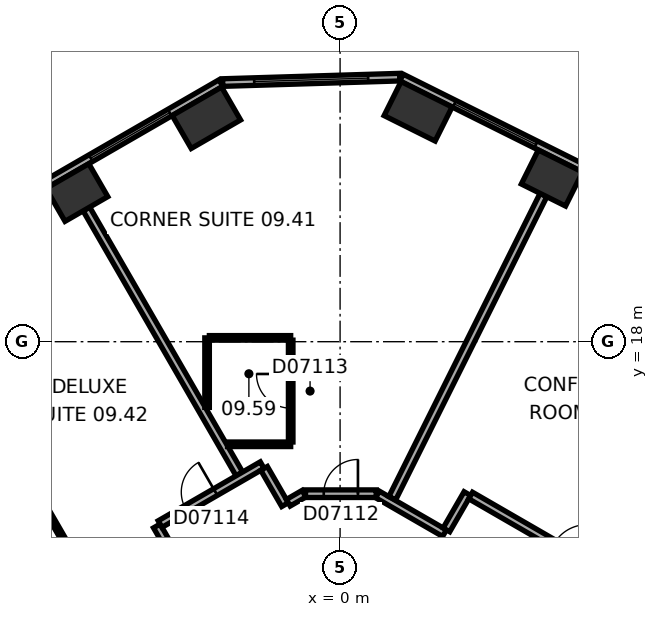
"""IFC4 building model, lengths in metres.
Left out: names, types, materials, properties, quantities, classifications, styles, units other than length and angle.
Written with IfcOpenShell. Run it as: python <this file> out.ifc"""

import sys

from ifc_helpers import new_model, si_unit, direction, frame, frame_2d, origin, origin_2d, place, context, subcontext, project, spatial, rectangle, extrude, element, fill, save


model = new_model("IFC4")
c1 = context("Model", 3, precision=1e-05, world=origin(), true_north=direction((0.0, 1.0)))
c2 = subcontext(c1, "Body", "Model", "MODEL_VIEW")
j1 = project(units=[si_unit("LENGTHUNIT", "METRE"), si_unit("PLANEANGLEUNIT", "RADIAN")], contexts=[c1])
p1 = place(None, origin())
s1 = spatial("IfcSite", under=j1, at=p1, CompositionType="ELEMENT")
p2 = place(p1, origin())
s2 = spatial("IfcBuilding", under=s1, at=p2, CompositionType="ELEMENT")
p3 = place(p2, frame((0.0, 0.0, 50.6)))
s3 = spatial("IfcBuildingStorey", under=s2, at=p3, CompositionType="ELEMENT", Elevation=50.6)
p4 = place(p3, frame((5.574, 22.306, 0.0), z_axis=(0.0, 0.0, 1.0), x_axis=(-0.894934361602, 0.44619781311, 0.0)))
e1 = element("IfcColumn", 1, at=p4, inside=s3, PredefinedType="COLUMN", context=c2, shape_type="SweptSolid", body=[
    extrude(rectangle(XDim=1.3, YDim=1.0, at=origin_2d()), origin(), (0.0, 0.0, 1.0), 3.3),
])
for number, where, z_axis, x_axis in (
    (2, (2.053, 24.062, 0.0), (0.0, 0.0, 1.0), (-0.895, 0.446, 0.0)),
    (3, (-3.518, 23.892, 0.0), (0.0, 0.0, 1.0), (-0.866, -0.5, 0.0)),
):
    element("IfcColumn", number, at=place(p3, frame(where, z_axis=z_axis, x_axis=x_axis)), inside=s3, PredefinedType="COLUMN", context=c2, shape_type="SweptSolid", body=[
        extrude(rectangle(XDim=1.5, YDim=1.0, at=origin_2d()), origin(), (0.0, 0.0, 1.0), 3.3),
    ])
p5 = place(p3, frame((-6.926, 21.925, 0.0), z_axis=(0.0, 0.0, 1.0), x_axis=(-0.866025403784, -0.5, 0.0)))
e4 = element("IfcColumn", 4, at=p5, inside=s3, PredefinedType="COLUMN", context=c2, shape_type="SweptSolid", body=[
    extrude(rectangle(XDim=1.3, YDim=1.0, at=origin_2d()), origin(), (0.0, 0.0, 1.0), 3.3),
])
p6 = place(p3, frame((20.63, 15.47, 0.0), z_axis=(0.0, 0.0, 1.0), x_axis=(-0.894934518609, 0.446197498203, 0.0)))
e5 = element("IfcWall", 5, at=p6, inside=s3, PredefinedType="STANDARD", context=c2, shape_type="SweptSolid", body=[
    extrude(rectangle(XDim=21.246, YDim=0.2, at=frame_2d((10.623, 0.0))), origin(), (0.0, 0.0, 1.0), 3.3),
])
p7 = place(p6, frame((1.553, 0.0, 0.8)))
e6 = element("IfcOpeningElement", 6, at=p7, cuts=e5, PredefinedType="OPENING", context=c2, shape_type="SweptSolid", body=[
    extrude(rectangle(XDim=2.4, YDim=1.7, at=frame_2d((1.2, 0.85))), frame((0.0, 0.11, 0.0), z_axis=(0.0, -1.0, 0.0), x_axis=(1.0, 0.0, 0.0)), (0.0, 0.0, 1.0), 0.22),
])
p8 = place(p6, frame((5.488, 0.0, 0.8)))
e7 = element("IfcOpeningElement", 7, at=p8, cuts=e5, PredefinedType="OPENING", context=c2, shape_type="SweptSolid", body=[
    extrude(rectangle(XDim=2.4, YDim=1.7, at=frame_2d((1.2, 0.85))), frame((0.0, 0.11, 0.0), z_axis=(0.0, -1.0, 0.0), x_axis=(1.0, 0.0, 0.0)), (0.0, 0.0, 1.0), 0.22),
])
p9 = place(p6, frame((9.422, 0.0, 0.8)))
e8 = element("IfcOpeningElement", 8, at=p9, cuts=e5, PredefinedType="OPENING", context=c2, shape_type="SweptSolid", body=[
    extrude(rectangle(XDim=2.4, YDim=1.7, at=frame_2d((1.2, 0.85))), frame((0.0, 0.11, 0.0), z_axis=(0.0, -1.0, 0.0), x_axis=(1.0, 0.0, 0.0)), (0.0, 0.0, 1.0), 0.22),
])
p10 = place(p6, frame((13.357, 0.0, 0.8)))
e9 = element("IfcOpeningElement", 9, at=p10, cuts=e5, PredefinedType="OPENING", context=c2, shape_type="SweptSolid", body=[
    extrude(rectangle(XDim=2.4, YDim=1.7, at=frame_2d((1.2, 0.85))), frame((0.0, 0.11, 0.0), z_axis=(0.0, -1.0, 0.0), x_axis=(1.0, 0.0, 0.0)), (0.0, 0.0, 1.0), 0.22),
])
p11 = place(p6, frame((17.292, 0.0, 0.8)))
e10 = element("IfcOpeningElement", 10, at=p11, cuts=e5, PredefinedType="OPENING", context=c2, shape_type="SweptSolid", body=[
    extrude(rectangle(XDim=2.4, YDim=1.7, at=frame_2d((1.2, 0.85))), frame((0.0, 0.11, 0.0), z_axis=(0.0, -1.0, 0.0), x_axis=(1.0, 0.0, 0.0)), (0.0, 0.0, 1.0), 0.22),
])
p12 = place(p3, frame((1.568, 24.961, 0.0), z_axis=(0.0, 0.0, 1.0), x_axis=(-0.999533359013, -0.030546099927, 0.0)))
e11 = element("IfcWall", 11, at=p12, inside=s3, PredefinedType="STANDARD", context=c2, shape_type="SweptSolid", body=[
    extrude(rectangle(XDim=4.66, YDim=0.2, at=frame_2d((2.33, 0.0))), origin(), (0.0, 0.0, 1.0), 3.3),
])
p13 = place(p12, frame((0.83, 0.0, 0.8)))
e12 = element("IfcOpeningElement", 12, at=p13, cuts=e11, PredefinedType="OPENING", context=c2, shape_type="SweptSolid", body=[
    extrude(rectangle(XDim=3.0, YDim=1.7, at=frame_2d((1.5, 0.85))), frame((0.0, 0.11, 0.0), z_axis=(0.0, -1.0, 0.0), x_axis=(1.0, 0.0, 0.0)), (0.0, 0.0, 1.0), 0.22),
])
p14 = place(p3, frame((-3.136, 24.805, 0.0), z_axis=(0.0, 0.0, 1.0), x_axis=(-0.866028291626, -0.499994998079, 0.0)))
e13 = element("IfcWall", 13, at=p14, inside=s3, PredefinedType="STANDARD", context=c2, shape_type="SweptSolid", body=[
    extrude(rectangle(XDim=21.246, YDim=0.2, at=frame_2d((10.623, 0.0))), origin(), (0.0, 0.0, 1.0), 3.3),
])
p15 = place(p14, frame((1.555, 0.0, 0.8)))
e14 = element("IfcOpeningElement", 14, at=p15, cuts=e13, PredefinedType="OPENING", context=c2, shape_type="SweptSolid", body=[
    extrude(rectangle(XDim=2.4, YDim=1.7, at=frame_2d((1.2, 0.85))), frame((0.0, 0.11, 0.0), z_axis=(0.0, -1.0, 0.0), x_axis=(1.0, 0.0, 0.0)), (0.0, 0.0, 1.0), 0.22),
])
p16 = place(p14, frame((5.489, 0.0, 0.8)))
e15 = element("IfcOpeningElement", 15, at=p16, cuts=e13, PredefinedType="OPENING", context=c2, shape_type="SweptSolid", body=[
    extrude(rectangle(XDim=2.4, YDim=1.7, at=frame_2d((1.2, 0.85))), frame((0.0, 0.11, 0.0), z_axis=(0.0, -1.0, 0.0), x_axis=(1.0, 0.0, 0.0)), (0.0, 0.0, 1.0), 0.22),
])
p17 = place(p14, frame((9.424, 0.0, 0.8)))
e16 = element("IfcOpeningElement", 16, at=p17, cuts=e13, PredefinedType="OPENING", context=c2, shape_type="SweptSolid", body=[
    extrude(rectangle(XDim=2.4, YDim=1.7, at=frame_2d((1.2, 0.85))), frame((0.0, 0.11, 0.0), z_axis=(0.0, -1.0, 0.0), x_axis=(1.0, 0.0, 0.0)), (0.0, 0.0, 1.0), 0.22),
])
p18 = place(p14, frame((13.358, 0.0, 0.8)))
e17 = element("IfcOpeningElement", 17, at=p18, cuts=e13, PredefinedType="OPENING", context=c2, shape_type="SweptSolid", body=[
    extrude(rectangle(XDim=2.4, YDim=1.7, at=frame_2d((1.2, 0.85))), frame((0.0, 0.11, 0.0), z_axis=(0.0, -1.0, 0.0), x_axis=(1.0, 0.0, 0.0)), (0.0, 0.0, 1.0), 0.22),
])
p19 = place(p14, frame((17.293, 0.0, 0.8)))
e18 = element("IfcOpeningElement", 18, at=p19, cuts=e13, PredefinedType="OPENING", context=c2, shape_type="SweptSolid", body=[
    extrude(rectangle(XDim=2.4, YDim=1.7, at=frame_2d((1.2, 0.85))), frame((0.0, 0.11, 0.0), z_axis=(0.0, -1.0, 0.0), x_axis=(1.0, 0.0, 0.0)), (0.0, 0.0, 1.0), 0.22),
])
p20 = place(p3, frame((-7.687, 13.506, 0.0), z_axis=(0.0, 0.0, 1.0), x_axis=(0.499985389037, -0.866033839264, 0.0)))
e19 = element("IfcWall", 19, at=p20, inside=s3, PredefinedType="PARTITIONING", context=c2, shape_type="SweptSolid", body=[
    extrude(rectangle(XDim=2.84, YDim=0.12, at=frame_2d((1.42, 0.0))), origin(), (0.0, 0.0, 1.0), 2.6),
])
p21 = place(p20, frame((0.97, 0.0, 0.0)))
e20 = element("IfcOpeningElement", 20, at=p21, cuts=e19, PredefinedType="OPENING", context=c2, shape_type="SweptSolid", body=[
    extrude(rectangle(XDim=0.9, YDim=2.1, at=frame_2d((0.45, 1.05))), frame((0.0, 0.07, 0.0), z_axis=(0.0, -1.0, 0.0), x_axis=(1.0, 0.0, 0.0)), (0.0, 0.0, 1.0), 0.14),
])
p22 = place(p3, frame((-6.676, 21.492, 0.0), z_axis=(0.0, 0.0, 1.0), x_axis=(0.500011263043, -0.866018900966, 0.0)))
e21 = element("IfcWall", 21, at=p22, inside=s3, PredefinedType="PARTITIONING", context=c2, shape_type="SweptSolid", body=[
    extrude(rectangle(XDim=8.049, YDim=0.2, at=frame_2d((4.024, 0.0))), origin(), (0.0, 0.0, 1.0), 3.05),
])
p23 = place(p3, frame((-4.823, 13.152, 0.0), z_axis=(0.0, 0.0, 1.0), x_axis=(0.499986357472, -0.866033280158, 0.0)))
e22 = element("IfcWall", 22, at=p23, inside=s3, PredefinedType="PARTITIONING", context=c2, shape_type="SweptSolid", body=[
    extrude(rectangle(XDim=1.201, YDim=0.2, at=frame_2d((0.601, 0.0))), origin(), (0.0, 0.0, 1.0), 3.05),
])
p24 = place(p3, frame((-3.5, 16.271, 0.0), z_axis=(0.0, 0.0, 1.0), x_axis=(0.0, 1.0, 0.0)))
e23 = element("IfcWall", 23, at=p24, inside=s3, PredefinedType="PARTITIONING", context=c2, shape_type="SweptSolid", body=[
    extrude(rectangle(XDim=1.829, YDim=0.12, at=frame_2d((0.915, 0.0))), origin(), (0.0, 0.0, 1.0), 3.05),
])
p25 = place(p3, frame((-3.44, 18.101, 0.0), z_axis=(0.0, 0.0, 1.0), x_axis=(1.0, 0.0, 0.0)))
e24 = element("IfcWall", 24, at=p25, inside=s3, PredefinedType="PARTITIONING", context=c2, shape_type="SweptSolid", body=[
    extrude(rectangle(XDim=2.14, YDim=0.12, at=frame_2d((1.07, 0.0))), origin(), (0.0, 0.0, 1.0), 3.05),
])
p26 = place(p3, frame((-2.05, 14.752, 0.0), z_axis=(0.0, 0.0, 1.0), x_axis=(-0.866030936828, -0.499990416364, 0.0)))
e25 = element("IfcWall", 25, at=p26, inside=s3, PredefinedType="PARTITIONING", context=c2, shape_type="SweptSolid", body=[
    extrude(rectangle(XDim=3.102, YDim=0.2, at=frame_2d((1.551, 0.0))), origin(), (0.0, 0.0, 1.0), 3.05),
])
p27 = place(p26, frame((1.419, 0.0, 0.0)))
e26 = element("IfcOpeningElement", 26, at=p27, cuts=e25, PredefinedType="OPENING", context=c2, shape_type="SweptSolid", body=[
    extrude(rectangle(XDim=0.9, YDim=2.1, at=frame_2d((0.45, 1.05))), frame((0.0, 0.11, 0.0), z_axis=(0.0, -1.0, 0.0), x_axis=(1.0, 0.0, 0.0)), (0.0, 0.0, 1.0), 0.22),
])
p28 = place(p3, frame((-1.449, 13.712, 0.0), z_axis=(0.0, 0.0, 1.0), x_axis=(-0.499978356969, 0.866037899034, 0.0)))
e27 = element("IfcWall", 27, at=p28, inside=s3, PredefinedType="PARTITIONING", context=c2, shape_type="SweptSolid", body=[
    extrude(rectangle(XDim=1.101, YDim=0.2, at=frame_2d((0.551, 0.0))), origin(), (0.0, 0.0, 1.0), 3.05),
])
p29 = place(p3, frame((-1.3, 15.301, 0.0), z_axis=(0.0, 0.0, 1.0), x_axis=(-1.0, 0.0, 0.0)))
e28 = element("IfcWall", 28, at=p29, inside=s3, PredefinedType="PARTITIONING", context=c2, shape_type="SweptSolid", body=[
    extrude(rectangle(XDim=1.661, YDim=0.12, at=frame_2d((0.831, 0.0))), origin(), (0.0, 0.0, 1.0), 3.05),
])
p30 = place(p3, frame((-1.3, 18.041, 0.0), z_axis=(0.0, 0.0, 1.0), x_axis=(0.0, -1.0, 0.0)))
e29 = element("IfcWall", 29, at=p30, inside=s3, PredefinedType="PARTITIONING", context=c2, shape_type="SweptSolid", body=[
    extrude(rectangle(XDim=2.68, YDim=0.12, at=frame_2d((1.34, 0.0))), origin(), (0.0, 0.0, 1.0), 3.05),
])
p31 = place(p30, frame((0.89, 0.0, 0.0)))
e30 = element("IfcOpeningElement", 30, at=p31, cuts=e29, PredefinedType="OPENING", context=c2, shape_type="SweptSolid", body=[
    extrude(rectangle(XDim=0.9, YDim=2.1, at=frame_2d((0.45, 1.05))), frame((0.0, 0.07, 0.0), z_axis=(0.0, -1.0, 0.0), x_axis=(1.0, 0.0, 0.0)), (0.0, 0.0, 1.0), 0.14),
])
p32 = place(p3, frame((-0.95, 14.001, 0.0), z_axis=(0.0, 0.0, 1.0), x_axis=(-0.86609177584, -0.499885022602, 0.0)))
e31 = element("IfcWall", 31, at=p32, inside=s3, PredefinedType="PARTITIONING", context=c2, shape_type="SweptSolid", body=[
    extrude(rectangle(XDim=0.477, YDim=0.2, at=frame_2d((0.238, 0.0))), origin(), (0.0, 0.0, 1.0), 3.05),
])
p33 = place(p3, frame((0.95, 14.001, 0.0), z_axis=(0.0, 0.0, 1.0), x_axis=(-1.0, 0.0, 0.0)))
e32 = element("IfcWall", 32, at=p33, inside=s3, PredefinedType="PARTITIONING", context=c2, shape_type="SweptSolid", body=[
    extrude(rectangle(XDim=1.86, YDim=0.2, at=frame_2d((0.93, 0.0))), origin(), (0.0, 0.0, 1.0), 3.05),
])
p34 = place(p33, frame((0.48, 0.0, 0.0)))
e33 = element("IfcOpeningElement", 33, at=p34, cuts=e32, PredefinedType="OPENING", context=c2, shape_type="SweptSolid", body=[
    extrude(rectangle(XDim=0.9, YDim=2.1, at=frame_2d((0.45, 1.05))), frame((0.0, 0.11, 0.0), z_axis=(0.0, -1.0, 0.0), x_axis=(1.0, 0.0, 0.0)), (0.0, 0.0, 1.0), 0.22),
])
p35 = place(p3, frame((2.748, 12.962, 0.0), z_axis=(0.0, 0.0, 1.0), x_axis=(-0.866013897511, 0.50001992892, 0.0)))
e34 = element("IfcWall", 34, at=p35, inside=s3, PredefinedType="PARTITIONING", context=c2, shape_type="SweptSolid", body=[
    extrude(rectangle(XDim=2.037, YDim=0.2, at=frame_2d((1.018, 0.0))), origin(), (0.0, 0.0, 1.0), 3.05),
])
p36 = place(p3, frame((3.349, 14.002, 0.0), z_axis=(0.0, 0.0, 1.0), x_axis=(-0.500074377092, -0.865982457891, 0.0)))
e35 = element("IfcWall", 35, at=p36, inside=s3, PredefinedType="PARTITIONING", context=c2, shape_type="SweptSolid", body=[
    extrude(rectangle(XDim=1.101, YDim=0.2, at=frame_2d((0.55, 0.0))), origin(), (0.0, 0.0, 1.0), 3.05),
])
p37 = place(p3, frame((5.351, 21.859, 0.0), z_axis=(0.0, 0.0, 1.0), x_axis=(-0.446205309328, -0.894930624086, 0.0)))
e36 = element("IfcWall", 36, at=p37, inside=s3, PredefinedType="PARTITIONING", context=c2, shape_type="SweptSolid", body=[
    extrude(rectangle(XDim=8.913, YDim=0.2, at=frame_2d((4.457, 0.0))), origin(), (0.0, 0.0, 1.0), 2.6),
])
p38 = place(p3, frame((10.885, 9.652, 0.0), z_axis=(0.0, 0.0, 1.0), x_axis=(-0.866033868542, 0.499985338323, 0.0)))
e37 = element("IfcWall", 37, at=p38, inside=s3, PredefinedType="PARTITIONING", context=c2, shape_type="SweptSolid", body=[
    extrude(rectangle(XDim=8.602, YDim=0.2, at=frame_2d((4.301, 0.0))), origin(), (0.0, 0.0, 1.0), 3.05),
])
p39 = place(p38, frame((5.069, 0.0, 0.0)))
e38 = element("IfcOpeningElement", 38, at=p39, cuts=e37, PredefinedType="OPENING", context=c2, shape_type="SweptSolid", body=[
    extrude(rectangle(XDim=1.0, YDim=2.1, at=frame_2d((0.5, 1.05))), frame((0.0, 0.11, 0.0), z_axis=(0.0, -1.0, 0.0), x_axis=(1.0, 0.0, 0.0)), (0.0, 0.0, 1.0), 0.22),
])
p40 = place(p11, origin())
e39 = element("IfcWindow", 39, at=p40, inside=s3, PartitioningType="SINGLE_PANEL", PredefinedType="WINDOW", context=c2, shape_type="SweptSolid", body=[
    extrude(rectangle(XDim=2.4, YDim=1.7, at=frame_2d((1.2, 0.85))), frame((0.0, 0.03, 0.0), z_axis=(0.0, -1.0, 0.0), x_axis=(1.0, 0.0, 0.0)), (0.0, 0.0, 1.0), 0.06),
])
fill(e10, e39)
p41 = place(p13, origin())
e40 = element("IfcWindow", 40, at=p41, inside=s3, PartitioningType="SINGLE_PANEL", PredefinedType="WINDOW", context=c2, shape_type="SweptSolid", body=[
    extrude(rectangle(XDim=3.0, YDim=1.7, at=frame_2d((1.5, 0.85))), frame((0.0, 0.03, 0.0), z_axis=(0.0, -1.0, 0.0), x_axis=(1.0, 0.0, 0.0)), (0.0, 0.0, 1.0), 0.06),
])
fill(e12, e40)
p42 = place(p15, origin())
e41 = element("IfcWindow", 41, at=p42, inside=s3, PartitioningType="SINGLE_PANEL", PredefinedType="WINDOW", context=c2, shape_type="SweptSolid", body=[
    extrude(rectangle(XDim=2.4, YDim=1.7, at=frame_2d((1.2, 0.85))), frame((0.0, 0.03, 0.0), z_axis=(0.0, -1.0, 0.0), x_axis=(1.0, 0.0, 0.0)), (0.0, 0.0, 1.0), 0.06),
])
fill(e14, e41)
p43 = place(p34, origin())
e42 = element("IfcDoor", 42, at=p43, inside=s3, OperationType="SINGLE_SWING_LEFT", PredefinedType="DOOR", context=c2, shape_type="SweptSolid", body=[
    extrude(rectangle(XDim=0.9, YDim=2.1, at=frame_2d((0.45, 1.05))), frame((0.0, 0.025, 0.0), z_axis=(0.0, -1.0, 0.0), x_axis=(1.0, 0.0, 0.0)), (0.0, 0.0, 1.0), 0.05),
])
fill(e33, e42)
p44 = place(p31, origin())
e43 = element("IfcDoor", 43, at=p44, inside=s3, OperationType="SINGLE_SWING_LEFT", PredefinedType="DOOR", context=c2, shape_type="SweptSolid", body=[
    extrude(rectangle(XDim=0.9, YDim=2.1, at=frame_2d((0.45, 1.05))), frame((0.0, 0.025, 0.0), z_axis=(0.0, -1.0, 0.0), x_axis=(1.0, 0.0, 0.0)), (0.0, 0.0, 1.0), 0.05),
])
fill(e30, e43)
p45 = place(p27, origin())
e44 = element("IfcDoor", 44, at=p45, inside=s3, OperationType="SINGLE_SWING_LEFT", PredefinedType="DOOR", context=c2, shape_type="SweptSolid", body=[
    extrude(rectangle(XDim=0.9, YDim=2.1, at=frame_2d((0.45, 1.05))), frame((0.0, 0.025, 0.0), z_axis=(0.0, -1.0, 0.0), x_axis=(1.0, 0.0, 0.0)), (0.0, 0.0, 1.0), 0.05),
])
fill(e26, e44)
save(model, sys.argv[1])
